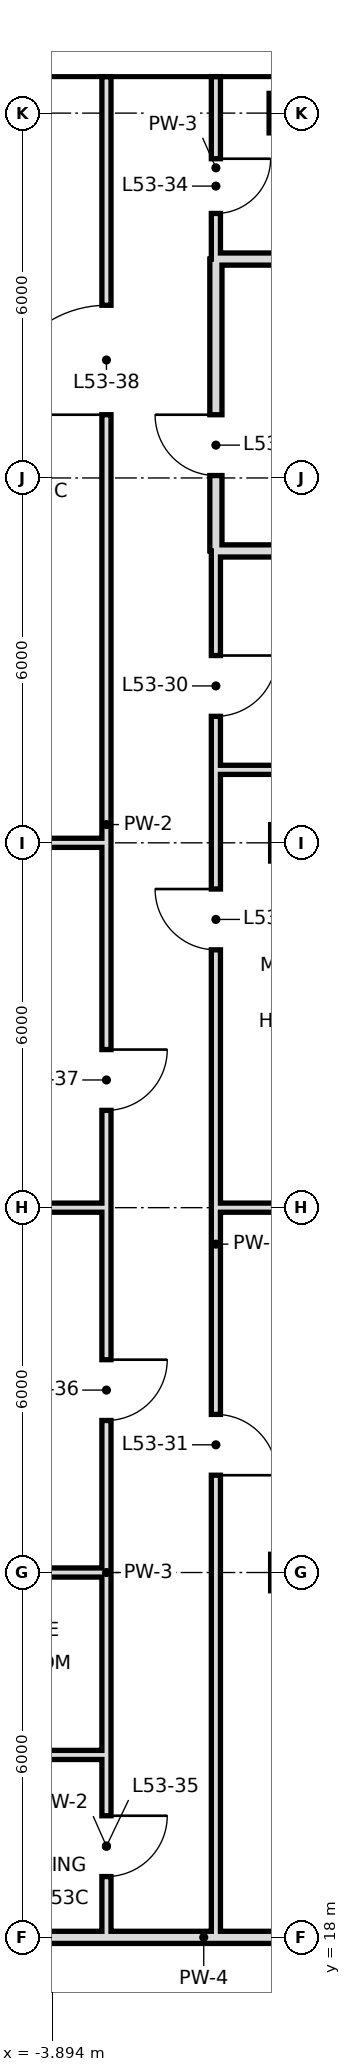
"""IFC4 building model, lengths in metres.
Left out: names, types, materials, properties, quantities, classifications, styles, units other than length and angle.
Written with IfcOpenShell. Run it as: python <this file> out.ifc"""

import sys

from ifc_helpers import new_model, si_unit, direction, frame, frame_2d, origin, origin_2d, place, context, subcontext, project, spatial, rectangle, hollow_rectangle, extrude, element, fill, save


model = new_model("IFC4")
c1 = context("Model", 3, precision=1e-05, world=origin(), true_north=direction((0.0, 1.0)))
c2 = subcontext(c1, "Body", "Model", "MODEL_VIEW")
j1 = project(units=[si_unit("LENGTHUNIT", "METRE"), si_unit("PLANEANGLEUNIT", "RADIAN")], contexts=[c1])
p1 = place(None, origin())
s1 = spatial("IfcSite", under=j1, at=p1, CompositionType="ELEMENT")
p2 = place(p1, origin())
s2 = spatial("IfcBuilding", under=s1, at=p2, CompositionType="ELEMENT")
p3 = place(p2, frame((0.0, 0.0, 226.2)))
s3 = spatial("IfcBuildingStorey", under=s2, at=p3, CompositionType="ELEMENT", Elevation=226.2)
p4 = place(p3, frame((0.0, 48.0, 0.0), z_axis=(0.0, 0.0, 1.0), x_axis=(1.0, 0.0, 0.0)))
e1 = element("IfcColumn", 1, at=p4, inside=s3, PredefinedType="COLUMN", context=c2, shape_type="SweptSolid", body=[
    extrude(hollow_rectangle(XDim=0.65, YDim=0.65, WallThickness=0.032, at=origin_2d()), origin(), (0.0, 0.0, 1.0), 3.6),
])
p5 = place(p3, frame((-1.2, 40.8, 0.0), z_axis=(0.0, 0.0, 1.0), x_axis=(0.0, 1.0, 0.0)))
e2 = element("IfcWall", 2, at=p5, inside=s3, PredefinedType="SOLIDWALL", context=c2, shape_type="SweptSolid", body=[
    extrude(rectangle(XDim=4.8, YDim=0.2, at=frame_2d((2.4, 0.0))), origin(), (0.0, 0.0, 1.0), 2.72),
])
p6 = place(p5, frame((1.24, 0.0, 0.0)))
e3 = element("IfcOpeningElement", 3, at=p6, cuts=e2, PredefinedType="OPENING", context=c2, shape_type="SweptSolid", body=[
    extrude(rectangle(XDim=1.0, YDim=2.4, at=frame_2d((0.5, 1.2))), frame((0.0, 0.11, 0.0), z_axis=(0.0, -1.0, 0.0), x_axis=(1.0, 0.0, 0.0)), (0.0, 0.0, 1.0), 0.22),
])
p7 = place(p3, frame((-1.2, 18.0, 0.0), z_axis=(0.0, 0.0, 1.0), x_axis=(0.0, 1.0, 0.0)))
e4 = element("IfcWall", 4, at=p7, inside=s3, PredefinedType="PARTITIONING", context=c2, shape_type="SweptSolid", body=[
    extrude(rectangle(XDim=22.8, YDim=0.15, at=frame_2d((11.4, 0.0))), origin(), (0.0, 0.0, 1.0), 3.42),
])
p8 = place(p7, frame((20.08, 0.0, 0.0)))
e5 = element("IfcOpeningElement", 5, at=p8, cuts=e4, PredefinedType="OPENING", context=c2, shape_type="SweptSolid", body=[
    extrude(rectangle(XDim=1.0, YDim=2.4, at=frame_2d((0.5, 1.2))), frame((0.0, 0.085, 0.0), z_axis=(0.0, -1.0, 0.0), x_axis=(1.0, 0.0, 0.0)), (0.0, 0.0, 1.0), 0.17),
])
p9 = place(p7, frame((7.6, 0.0, 0.0)))
e6 = element("IfcOpeningElement", 6, at=p9, cuts=e4, PredefinedType="OPENING", context=c2, shape_type="SweptSolid", body=[
    extrude(rectangle(XDim=1.0, YDim=2.4, at=frame_2d((0.5, 1.2))), frame((0.0, 0.085, 0.0), z_axis=(0.0, -1.0, 0.0), x_axis=(1.0, 0.0, 0.0)), (0.0, 0.0, 1.0), 0.17),
])
p10 = place(p7, frame((16.24, 0.0, 0.0)))
e7 = element("IfcOpeningElement", 7, at=p10, cuts=e4, PredefinedType="OPENING", context=c2, shape_type="SweptSolid", body=[
    extrude(rectangle(XDim=1.0, YDim=2.4, at=frame_2d((0.5, 1.2))), frame((0.0, 0.085, 0.0), z_axis=(0.0, -1.0, 0.0), x_axis=(1.0, 0.0, 0.0)), (0.0, 0.0, 1.0), 0.17),
])
p11 = place(p3, frame((-1.2, 45.6, 0.0), z_axis=(0.0, 0.0, 1.0), x_axis=(0.0, 1.0, 0.0)))
e8 = element("IfcWall", 8, at=p11, inside=s3, PredefinedType="PARTITIONING", context=c2, shape_type="SweptSolid", body=[
    extrude(rectangle(XDim=3.0, YDim=0.15, at=frame_2d((1.5, 0.0))), origin(), (0.0, 0.0, 1.0), 3.42),
])
p12 = place(p11, frame((0.75, 0.0, 0.0)))
e9 = element("IfcOpeningElement", 9, at=p12, cuts=e8, PredefinedType="OPENING", context=c2, shape_type="SweptSolid", body=[
    extrude(rectangle(XDim=0.9, YDim=2.4, at=frame_2d((0.45, 1.2))), frame((0.0, 0.085, 0.0), z_axis=(0.0, -1.0, 0.0), x_axis=(1.0, 0.0, 0.0)), (0.0, 0.0, 1.0), 0.17),
])
p13 = place(p3, frame((-3.0, 18.0, 0.0), z_axis=(0.0, 0.0, 1.0), x_axis=(0.0, 1.0, 0.0)))
e10 = element("IfcWall", 10, at=p13, inside=s3, PredefinedType="PARTITIONING", context=c2, shape_type="SweptSolid", body=[
    extrude(rectangle(XDim=3.0, YDim=0.15, at=frame_2d((1.5, 0.0))), origin(), (0.0, 0.0, 1.0), 3.42),
])
p14 = place(p13, frame((1.0, 0.0, 0.0)))
e11 = element("IfcOpeningElement", 11, at=p14, cuts=e10, PredefinedType="OPENING", context=c2, shape_type="SweptSolid", body=[
    extrude(rectangle(XDim=1.0, YDim=2.4, at=frame_2d((0.5, 1.2))), frame((0.0, 0.085, 0.0), z_axis=(0.0, -1.0, 0.0), x_axis=(1.0, 0.0, 0.0)), (0.0, 0.0, 1.0), 0.17),
])
p15 = place(p3, frame((-3.0, 24.0, 0.0), z_axis=(0.0, 0.0, 1.0), x_axis=(0.0, 1.0, 0.0)))
e12 = element("IfcWall", 12, at=p15, inside=s3, PredefinedType="PARTITIONING", context=c2, shape_type="SweptSolid", body=[
    extrude(rectangle(XDim=24.6, YDim=0.15, at=frame_2d((12.3, 0.0))), origin(), (0.0, 0.0, 1.0), 3.42),
])
p16 = place(p15, frame((2.5, 0.0, 0.0)))
e13 = element("IfcOpeningElement", 13, at=p16, cuts=e12, PredefinedType="OPENING", context=c2, shape_type="SweptSolid", body=[
    extrude(rectangle(XDim=1.0, YDim=2.4, at=frame_2d((0.5, 1.2))), frame((0.0, 0.085, 0.0), z_axis=(0.0, -1.0, 0.0), x_axis=(1.0, 0.0, 0.0)), (0.0, 0.0, 1.0), 0.17),
])
p17 = place(p15, frame((7.6, 0.0, 0.0)))
e14 = element("IfcOpeningElement", 14, at=p17, cuts=e12, PredefinedType="OPENING", context=c2, shape_type="SweptSolid", body=[
    extrude(rectangle(XDim=1.0, YDim=2.4, at=frame_2d((0.5, 1.2))), frame((0.0, 0.085, 0.0), z_axis=(0.0, -1.0, 0.0), x_axis=(1.0, 0.0, 0.0)), (0.0, 0.0, 1.0), 0.17),
])
p18 = place(p15, frame((19.04, 0.0, 0.0)))
e15 = element("IfcOpeningElement", 15, at=p18, cuts=e12, PredefinedType="OPENING", context=c2, shape_type="SweptSolid", body=[
    extrude(rectangle(XDim=1.8, YDim=2.4, at=frame_2d((0.9, 1.2))), frame((0.0, 0.085, 0.0), z_axis=(0.0, -1.0, 0.0), x_axis=(1.0, 0.0, 0.0)), (0.0, 0.0, 1.0), 0.17),
])
p19 = place(p3, frame((-3.0, 21.0, 0.0), z_axis=(0.0, 0.0, 1.0), x_axis=(0.0, 1.0, 0.0)))
e16 = element("IfcWall", 16, at=p19, inside=s3, PredefinedType="PARTITIONING", context=c2, shape_type="SweptSolid", body=[
    extrude(rectangle(XDim=3.0, YDim=0.15, at=frame_2d((1.5, 0.0))), origin(), (0.0, 0.0, 1.0), 3.42),
])
p20 = place(p3, frame((-6.6, 18.0, 0.0), z_axis=(0.0, 0.0, 1.0), x_axis=(1.0, 0.0, 0.0)))
e17 = element("IfcWall", 17, at=p20, inside=s3, PredefinedType="SOLIDWALL", context=c2, shape_type="SweptSolid", body=[
    extrude(rectangle(XDim=9.7, YDim=0.2, at=frame_2d((4.85, 0.0))), origin(), (0.0, 0.0, 1.0), 2.72),
])
p21 = place(p3, frame((-6.0, 21.0, 0.0), z_axis=(0.0, 0.0, 1.0), x_axis=(1.0, 0.0, 0.0)))
e18 = element("IfcWall", 18, at=p21, inside=s3, PredefinedType="PARTITIONING", context=c2, shape_type="SweptSolid", body=[
    extrude(rectangle(XDim=3.0, YDim=0.15, at=frame_2d((1.5, 0.0))), origin(), (0.0, 0.0, 1.0), 3.42),
])
p22 = place(p3, frame((-6.0, 24.0, 0.0), z_axis=(0.0, 0.0, 1.0), x_axis=(1.0, 0.0, 0.0)))
e19 = element("IfcWall", 19, at=p22, inside=s3, PredefinedType="PARTITIONING", context=c2, shape_type="SweptSolid", body=[
    extrude(rectangle(XDim=3.0, YDim=0.15, at=frame_2d((1.5, 0.0))), origin(), (0.0, 0.0, 1.0), 2.72),
])
p23 = place(p3, frame((-12.6, 30.0, 0.0), z_axis=(0.0, 0.0, 1.0), x_axis=(1.0, 0.0, 0.0)))
e20 = element("IfcWall", 20, at=p23, inside=s3, PredefinedType="PARTITIONING", context=c2, shape_type="SweptSolid", body=[
    extrude(rectangle(XDim=9.6, YDim=0.15, at=frame_2d((4.8, 0.0))), origin(), (0.0, 0.0, 1.0), 2.72),
])
p24 = place(p3, frame((-1.2, 30.0, 0.0), z_axis=(0.0, 0.0, 1.0), x_axis=(1.0, 0.0, 0.0)))
e21 = element("IfcWall", 21, at=p24, inside=s3, PredefinedType="PARTITIONING", context=c2, shape_type="SweptSolid", body=[
    extrude(rectangle(XDim=4.3, YDim=0.15, at=frame_2d((2.15, 0.0))), origin(), (0.0, 0.0, 1.0), 2.72),
])
p25 = place(p3, frame((-12.0, 36.0, 0.0), z_axis=(0.0, 0.0, 1.0), x_axis=(1.0, 0.0, 0.0)))
e22 = element("IfcWall", 22, at=p25, inside=s3, PredefinedType="PARTITIONING", context=c2, shape_type="SweptSolid", body=[
    extrude(rectangle(XDim=9.0, YDim=0.15, at=frame_2d((4.5, 0.0))), origin(), (0.0, 0.0, 1.0), 2.72),
])
p26 = place(p3, frame((-1.2, 37.2, 0.0), z_axis=(0.0, 0.0, 1.0), x_axis=(1.0, 0.0, 0.0)))
e23 = element("IfcWall", 23, at=p26, inside=s3, PredefinedType="PARTITIONING", context=c2, shape_type="SweptSolid", body=[
    extrude(rectangle(XDim=4.3, YDim=0.15, at=frame_2d((2.15, 0.0))), origin(), (0.0, 0.0, 1.0), 3.42),
])
for number, where, z_axis, x_axis in (
    (24, (-1.2, 40.8, 0.0), (0.0, 0.0, 1.0), (1.0, 0.0, 0.0)),
    (25, (-1.2, 45.6, 0.0), (0.0, 0.0, 1.0), (1.0, 0.0, 0.0)),
):
    element("IfcWall", number, at=place(p3, frame(where, z_axis=z_axis, x_axis=x_axis)), inside=s3, PredefinedType="SOLIDWALL", context=c2, shape_type="SweptSolid", body=[
        extrude(rectangle(XDim=4.3, YDim=0.2, at=frame_2d((2.15, 0.0))), origin(), (0.0, 0.0, 1.0), 2.72),
    ])
p27 = place(p8, origin())
e26 = element("IfcDoor", 26, at=p27, inside=s3, OperationType="SINGLE_SWING_RIGHT", PredefinedType="DOOR", context=c2, shape_type="SweptSolid", body=[
    extrude(rectangle(XDim=1.0, YDim=2.4, at=frame_2d((0.5, 1.2))), frame((0.0, 0.025, 0.0), z_axis=(0.0, -1.0, 0.0), x_axis=(1.0, 0.0, 0.0)), (0.0, 0.0, 1.0), 0.05),
])
fill(e5, e26)
p28 = place(p9, frame((1.0, 0.0, 0.0), z_axis=(0.0, 0.0, 1.0), x_axis=(-1.0, 0.0, 0.0)))
e27 = element("IfcDoor", 27, at=p28, inside=s3, OperationType="SINGLE_SWING_RIGHT", PredefinedType="DOOR", context=c2, shape_type="SweptSolid", body=[
    extrude(rectangle(XDim=1.0, YDim=2.4, at=frame_2d((0.5, 1.2))), frame((0.0, 0.025, 0.0), z_axis=(0.0, -1.0, 0.0), x_axis=(1.0, 0.0, 0.0)), (0.0, 0.0, 1.0), 0.05),
])
fill(e6, e27)
p29 = place(p10, frame((1.0, 0.0, 0.0), z_axis=(0.0, 0.0, 1.0), x_axis=(-1.0, 0.0, 0.0)))
e28 = element("IfcDoor", 28, at=p29, inside=s3, OperationType="SINGLE_SWING_LEFT", PredefinedType="DOOR", context=c2, shape_type="SweptSolid", body=[
    extrude(rectangle(XDim=1.0, YDim=2.4, at=frame_2d((0.5, 1.2))), frame((0.0, 0.025, 0.0), z_axis=(0.0, -1.0, 0.0), x_axis=(1.0, 0.0, 0.0)), (0.0, 0.0, 1.0), 0.05),
])
fill(e7, e28)
p30 = place(p6, frame((1.0, 0.0, 0.0), z_axis=(0.0, 0.0, 1.0), x_axis=(-1.0, 0.0, 0.0)))
e29 = element("IfcDoor", 29, at=p30, inside=s3, OperationType="SINGLE_SWING_LEFT", PredefinedType="DOOR", context=c2, shape_type="SweptSolid", body=[
    extrude(rectangle(XDim=1.0, YDim=2.4, at=frame_2d((0.5, 1.2))), frame((0.0, 0.025, 0.0), z_axis=(0.0, -1.0, 0.0), x_axis=(1.0, 0.0, 0.0)), (0.0, 0.0, 1.0), 0.05),
])
fill(e3, e29)
p31 = place(p12, origin())
e30 = element("IfcDoor", 30, at=p31, inside=s3, OperationType="SINGLE_SWING_RIGHT", PredefinedType="DOOR", context=c2, shape_type="SweptSolid", body=[
    extrude(rectangle(XDim=0.9, YDim=2.4, at=frame_2d((0.45, 1.2))), frame((0.0, 0.025, 0.0), z_axis=(0.0, -1.0, 0.0), x_axis=(1.0, 0.0, 0.0)), (0.0, 0.0, 1.0), 0.05),
])
fill(e9, e30)
p32 = place(p14, origin())
e31 = element("IfcDoor", 31, at=p32, inside=s3, OperationType="SINGLE_SWING_RIGHT", PredefinedType="DOOR", context=c2, shape_type="SweptSolid", body=[
    extrude(rectangle(XDim=1.0, YDim=2.4, at=frame_2d((0.5, 1.2))), frame((0.0, 0.025, 0.0), z_axis=(0.0, -1.0, 0.0), x_axis=(1.0, 0.0, 0.0)), (0.0, 0.0, 1.0), 0.05),
])
fill(e11, e31)
p33 = place(p16, origin())
e32 = element("IfcDoor", 32, at=p33, inside=s3, OperationType="SINGLE_SWING_RIGHT", PredefinedType="DOOR", context=c2, shape_type="SweptSolid", body=[
    extrude(rectangle(XDim=1.0, YDim=2.4, at=frame_2d((0.5, 1.2))), frame((0.0, 0.025, 0.0), z_axis=(0.0, -1.0, 0.0), x_axis=(1.0, 0.0, 0.0)), (0.0, 0.0, 1.0), 0.05),
])
fill(e13, e32)
p34 = place(p17, origin())
e33 = element("IfcDoor", 33, at=p34, inside=s3, OperationType="SINGLE_SWING_RIGHT", PredefinedType="DOOR", context=c2, shape_type="SweptSolid", body=[
    extrude(rectangle(XDim=1.0, YDim=2.4, at=frame_2d((0.5, 1.2))), frame((0.0, 0.025, 0.0), z_axis=(0.0, -1.0, 0.0), x_axis=(1.0, 0.0, 0.0)), (0.0, 0.0, 1.0), 0.05),
])
fill(e14, e33)
p35 = place(p18, origin())
e34 = element("IfcDoor", 34, at=p35, inside=s3, OperationType="SINGLE_SWING_LEFT", PredefinedType="DOOR", context=c2, shape_type="SweptSolid", body=[
    extrude(rectangle(XDim=1.8, YDim=2.4, at=frame_2d((0.9, 1.2))), frame((0.0, 0.025, 0.0), z_axis=(0.0, -1.0, 0.0), x_axis=(1.0, 0.0, 0.0)), (0.0, 0.0, 1.0), 0.05),
])
fill(e15, e34)
save(model, sys.argv[1])
